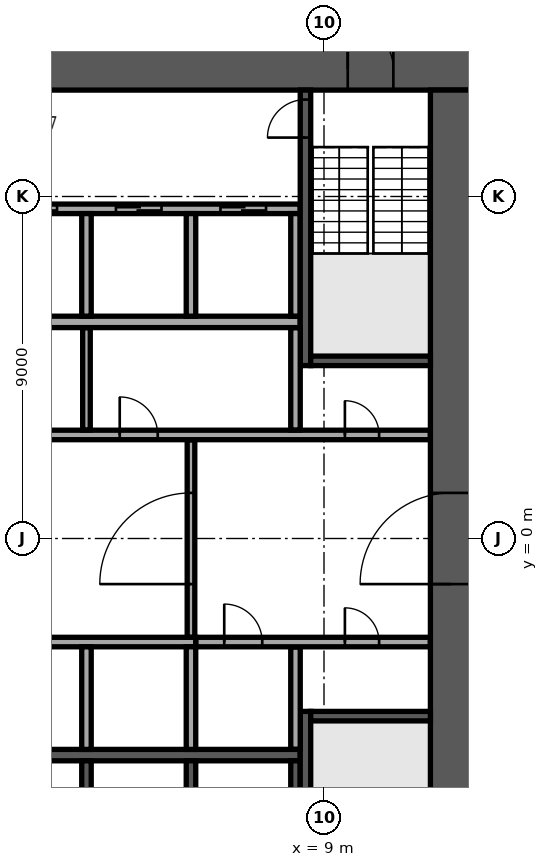
"""IFC4 building model, lengths in metres.
Left out: names, types, materials, properties, quantities, classifications, styles, units other than length and angle.
Written with IfcOpenShell. Run it as: python <this file> out.ifc"""

import sys

from ifc_helpers import new_model, si_unit, direction, frame, frame_2d, origin, place, context, subcontext, project, spatial, rectangle, extrude, element, fill, save


model = new_model("IFC4")
c1 = context("Model", 3, precision=1e-05, world=origin(), true_north=direction((0.0, 1.0)))
c2 = subcontext(c1, "Body", "Model", "MODEL_VIEW")
j1 = project(units=[si_unit("LENGTHUNIT", "METRE"), si_unit("PLANEANGLEUNIT", "RADIAN")], contexts=[c1])
p1 = place(None, origin())
s1 = spatial("IfcSite", under=j1, at=p1, CompositionType="ELEMENT")
p2 = place(p1, origin())
s2 = spatial("IfcBuilding", under=s1, at=p2, CompositionType="ELEMENT")
p3 = place(p2, frame((0.0, 0.0, 90.1)))
s3 = spatial("IfcBuildingStorey", under=s2, at=p3, CompositionType="ELEMENT", Elevation=90.1)
p4 = place(p3, frame((-12.9, 12.35, 0.0), z_axis=(0.0, 0.0, 1.0), x_axis=(1.0, 0.0, 0.0)))
e1 = element("IfcWall", 1, at=p4, inside=s3, PredefinedType="SHEAR", context=c2, shape_type="SweptSolid", body=[
    extrude(rectangle(XDim=25.8, YDim=1.1, at=frame_2d((12.9, 0.0))), origin(), (0.0, 0.0, 1.0), 3.58),
])
p5 = place(p4, frame((11.7, 0.0, 0.0)))
e2 = element("IfcOpeningElement", 2, at=p5, cuts=e1, PredefinedType="OPENING", context=c2, shape_type="SweptSolid", body=[
    extrude(rectangle(XDim=2.4, YDim=2.4, at=frame_2d((1.2, 1.2))), frame((0.0, 0.56, 0.0), z_axis=(0.0, -1.0, 0.0), x_axis=(1.0, 0.0, 0.0)), (0.0, 0.0, 1.0), 1.12),
])
p6 = place(p4, frame((22.525, 0.0, 0.0)))
e3 = element("IfcOpeningElement", 3, at=p6, cuts=e1, PredefinedType="OPENING", context=c2, shape_type="SweptSolid", body=[
    extrude(rectangle(XDim=1.2, YDim=2.1, at=frame_2d((0.6, 1.05))), frame((0.0, 0.56, 0.0), z_axis=(0.0, -1.0, 0.0), x_axis=(1.0, 0.0, 0.0)), (0.0, 0.0, 1.0), 1.12),
])
p7 = place(p4, frame((1.5, 0.0, 0.0)))
e4 = element("IfcOpeningElement", 4, at=p7, cuts=e1, PredefinedType="OPENING", context=c2, shape_type="SweptSolid", body=[
    extrude(rectangle(XDim=1.0, YDim=2.1, at=frame_2d((0.5, 1.05))), frame((0.0, 0.56, 0.0), z_axis=(0.0, -1.0, 0.0), x_axis=(1.0, 0.0, 0.0)), (0.0, 0.0, 1.0), 1.12),
])
p8 = place(p3, frame((12.35, -11.8, 0.0), z_axis=(0.0, 0.0, 1.0), x_axis=(0.0, 1.0, 0.0)))
e5 = element("IfcWall", 5, at=p8, inside=s3, PredefinedType="SHEAR", context=c2, shape_type="SweptSolid", body=[
    extrude(rectangle(XDim=23.6, YDim=1.1, at=frame_2d((11.8, 0.0))), origin(), (0.0, 0.0, 1.0), 3.58),
])
p9 = place(p8, frame((10.6, 0.0, 0.0)))
e6 = element("IfcOpeningElement", 6, at=p9, cuts=e5, PredefinedType="OPENING", context=c2, shape_type="SweptSolid", body=[
    extrude(rectangle(XDim=2.4, YDim=2.4, at=frame_2d((1.2, 1.2))), frame((0.0, 0.56, 0.0), z_axis=(0.0, -1.0, 0.0), x_axis=(1.0, 0.0, 0.0)), (0.0, 0.0, 1.0), 1.12),
])
for number, where, z_axis, x_axis in (
    (7, (-8.375, 5.7, 0.0), (0.0, 0.0, 1.0), (1.0, 0.0, 0.0)),
    (8, (-8.375, -5.7, 0.0), (0.0, 0.0, 1.0), (1.0, 0.0, 0.0)),
):
    element("IfcWall", number, at=place(p3, frame(where, z_axis=z_axis, x_axis=x_axis)), inside=s3, PredefinedType="SOLIDWALL", context=c2, shape_type="SweptSolid", body=[
        extrude(rectangle(XDim=16.75, YDim=0.3, at=frame_2d((8.375, 0.0))), origin(), (0.0, 0.0, 1.0), 3.58),
    ])
p10 = place(p3, frame((-8.375, 8.675, 0.0), z_axis=(0.0, 0.0, 1.0), x_axis=(1.0, 0.0, 0.0)))
e9 = element("IfcWall", 9, at=p10, inside=s3, PredefinedType="SOLIDWALL", context=c2, shape_type="SweptSolid", body=[
    extrude(rectangle(XDim=16.75, YDim=0.25, at=frame_2d((8.375, 0.0))), origin(), (0.0, 0.0, 1.0), 3.58),
])
p11 = place(p10, frame((0.9, 0.0, 0.0)))
e10 = element("IfcOpeningElement", 10, at=p11, cuts=e9, PredefinedType="OPENING", context=c2, shape_type="SweptSolid", body=[
    extrude(rectangle(XDim=1.2, YDim=2.1, at=frame_2d((0.6, 1.05))), frame((0.0, 0.135, 0.0), z_axis=(0.0, -1.0, 0.0), x_axis=(1.0, 0.0, 0.0)), (0.0, 0.0, 1.0), 0.27),
])
p12 = place(p10, frame((3.65, 0.0, 0.0)))
e11 = element("IfcOpeningElement", 11, at=p12, cuts=e9, PredefinedType="OPENING", context=c2, shape_type="SweptSolid", body=[
    extrude(rectangle(XDim=1.2, YDim=2.1, at=frame_2d((0.6, 1.05))), frame((0.0, 0.135, 0.0), z_axis=(0.0, -1.0, 0.0), x_axis=(1.0, 0.0, 0.0)), (0.0, 0.0, 1.0), 0.27),
])
p13 = place(p10, frame((6.4, 0.0, 0.0)))
e12 = element("IfcOpeningElement", 12, at=p13, cuts=e9, PredefinedType="OPENING", context=c2, shape_type="SweptSolid", body=[
    extrude(rectangle(XDim=1.2, YDim=2.1, at=frame_2d((0.6, 1.05))), frame((0.0, 0.135, 0.0), z_axis=(0.0, -1.0, 0.0), x_axis=(1.0, 0.0, 0.0)), (0.0, 0.0, 1.0), 0.27),
])
p14 = place(p10, frame((9.15, 0.0, 0.0)))
e13 = element("IfcOpeningElement", 13, at=p14, cuts=e9, PredefinedType="OPENING", context=c2, shape_type="SweptSolid", body=[
    extrude(rectangle(XDim=1.2, YDim=2.1, at=frame_2d((0.6, 1.05))), frame((0.0, 0.135, 0.0), z_axis=(0.0, -1.0, 0.0), x_axis=(1.0, 0.0, 0.0)), (0.0, 0.0, 1.0), 0.27),
])
p15 = place(p10, frame((11.9, 0.0, 0.0)))
e14 = element("IfcOpeningElement", 14, at=p15, cuts=e9, PredefinedType="OPENING", context=c2, shape_type="SweptSolid", body=[
    extrude(rectangle(XDim=1.2, YDim=2.1, at=frame_2d((0.6, 1.05))), frame((0.0, 0.135, 0.0), z_axis=(0.0, -1.0, 0.0), x_axis=(1.0, 0.0, 0.0)), (0.0, 0.0, 1.0), 0.27),
])
p16 = place(p10, frame((14.65, 0.0, 0.0)))
e15 = element("IfcOpeningElement", 15, at=p16, cuts=e9, PredefinedType="OPENING", context=c2, shape_type="SweptSolid", body=[
    extrude(rectangle(XDim=1.2, YDim=2.1, at=frame_2d((0.6, 1.05))), frame((0.0, 0.135, 0.0), z_axis=(0.0, -1.0, 0.0), x_axis=(1.0, 0.0, 0.0)), (0.0, 0.0, 1.0), 0.27),
])
for number, where, z_axis, x_axis in (
    (16, (2.75, 5.85, 0.0), (0.0, 0.0, 1.0), (0.0, 1.0, 0.0)),
    (17, (5.5, 5.85, 0.0), (0.0, 0.0, 1.0), (0.0, 1.0, 0.0)),
    (18, (8.25, 5.85, 0.0), (0.0, 0.0, 1.0), (0.0, 1.0, 0.0)),
):
    element("IfcWall", number, at=place(p3, frame(where, z_axis=z_axis, x_axis=x_axis)), inside=s3, PredefinedType="SOLIDWALL", context=c2, shape_type="SweptSolid", body=[
        extrude(rectangle(XDim=2.7, YDim=0.25, at=frame_2d((1.35, 0.0))), origin(), (0.0, 0.0, 1.0), 3.58),
    ])
p17 = place(p3, frame((-8.375, -2.725, 0.0), z_axis=(0.0, 0.0, 1.0), x_axis=(1.0, 0.0, 0.0)))
e19 = element("IfcWall", 19, at=p17, inside=s3, PredefinedType="SOLIDWALL", context=c2, shape_type="SweptSolid", body=[
    extrude(rectangle(XDim=14.0, YDim=0.25, at=frame_2d((7.0, 0.0))), origin(), (0.0, 0.0, 1.0), 3.58),
])
for number, where, z_axis, x_axis in (
    (20, (2.75, -5.55, 0.0), (0.0, 0.0, 1.0), (0.0, 1.0, 0.0)),
    (21, (5.5, -5.55, 0.0), (0.0, 0.0, 1.0), (0.0, 1.0, 0.0)),
    (22, (2.75, -8.55, 0.0), (0.0, 0.0, 1.0), (0.0, 1.0, 0.0)),
    (23, (5.5, -8.55, 0.0), (0.0, 0.0, 1.0), (0.0, 1.0, 0.0)),
    (24, (8.25, -8.55, 0.0), (0.0, 0.0, 1.0), (0.0, 1.0, 0.0)),
):
    element("IfcWall", number, at=place(p3, frame(where, z_axis=z_axis, x_axis=x_axis)), inside=s3, PredefinedType="SOLIDWALL", context=c2, shape_type="SweptSolid", body=[
        extrude(rectangle(XDim=2.7, YDim=0.25, at=frame_2d((1.35, 0.0))), origin(), (0.0, 0.0, 1.0), 3.58),
    ])
p18 = place(p3, frame((8.512, 4.55, 0.0), z_axis=(0.0, 0.0, 1.0), x_axis=(0.0, 1.0, 0.0)))
e25 = element("IfcWall", 25, at=p18, inside=s3, PredefinedType="SOLIDWALL", context=c2, shape_type="SweptSolid", body=[
    extrude(rectangle(XDim=7.25, YDim=0.275, at=frame_2d((3.625, 0.0))), origin(), (0.0, 0.0, 1.0), 3.58),
])
p19 = place(p18, frame((6.0, 0.0, 0.0)))
e26 = element("IfcOpeningElement", 26, at=p19, cuts=e25, PredefinedType="OPENING", context=c2, shape_type="SweptSolid", body=[
    extrude(rectangle(XDim=1.0, YDim=2.1, at=frame_2d((0.5, 1.05))), frame((0.0, 0.147, 0.0), z_axis=(0.0, -1.0, 0.0), x_axis=(1.0, 0.0, 0.0)), (0.0, 0.0, 1.0), 0.295),
])
p20 = place(p3, frame((8.65, 4.675, 0.0), z_axis=(0.0, 0.0, 1.0), x_axis=(1.0, 0.0, 0.0)))
e27 = element("IfcWall", 27, at=p20, inside=s3, PredefinedType="SOLIDWALL", context=c2, shape_type="SweptSolid", body=[
    extrude(rectangle(XDim=3.15, YDim=0.25, at=frame_2d((1.575, 0.0))), origin(), (0.0, 0.0, 1.0), 3.58),
])
p21 = place(p3, frame((8.512, -4.55, 0.0), z_axis=(0.0, 0.0, 1.0), x_axis=(0.0, -1.0, 0.0)))
e28 = element("IfcWall", 28, at=p21, inside=s3, PredefinedType="SOLIDWALL", context=c2, shape_type="SweptSolid", body=[
    extrude(rectangle(XDim=7.25, YDim=0.275, at=frame_2d((3.625, 0.0))), origin(), (0.0, 0.0, 1.0), 3.58),
])
p22 = place(p21, frame((6.0, 0.0, 0.0)))
e29 = element("IfcOpeningElement", 29, at=p22, cuts=e28, PredefinedType="OPENING", context=c2, shape_type="SweptSolid", body=[
    extrude(rectangle(XDim=1.0, YDim=2.1, at=frame_2d((0.5, 1.05))), frame((0.0, 0.147, 0.0), z_axis=(0.0, -1.0, 0.0), x_axis=(1.0, 0.0, 0.0)), (0.0, 0.0, 1.0), 0.295),
])
p23 = place(p3, frame((8.65, -4.675, 0.0), z_axis=(0.0, 0.0, 1.0), x_axis=(1.0, 0.0, 0.0)))
e30 = element("IfcWall", 30, at=p23, inside=s3, PredefinedType="SOLIDWALL", context=c2, shape_type="SweptSolid", body=[
    extrude(rectangle(XDim=3.15, YDim=0.25, at=frame_2d((1.575, 0.0))), origin(), (0.0, 0.0, 1.0), 3.58),
])
p24 = place(p3, frame((8.25, -5.545, 0.0), z_axis=(0.0, 0.0, 1.0), x_axis=(0.0, 1.0, 0.0)))
e31 = element("IfcWall", 31, at=p24, inside=s3, PredefinedType="PARTITIONING", context=c2, shape_type="SweptSolid", body=[
    extrude(rectangle(XDim=2.69, YDim=0.25, at=frame_2d((1.345, 0.0))), origin(), (0.0, 0.0, 1.0), 3.58),
])
p25 = place(p3, frame((5.63, -2.725, 0.0), z_axis=(0.0, 0.0, 1.0), x_axis=(1.0, 0.0, 0.0)))
e32 = element("IfcWall", 32, at=p25, inside=s3, PredefinedType="PARTITIONING", context=c2, shape_type="SweptSolid", body=[
    extrude(rectangle(XDim=6.165, YDim=0.25, at=frame_2d((3.083, 0.0))), origin(), (0.0, 0.0, 1.0), 3.58),
])
p26 = place(p25, frame((0.745, 0.0, 0.0)))
e33 = element("IfcOpeningElement", 33, at=p26, cuts=e32, PredefinedType="OPENING", context=c2, shape_type="SweptSolid", body=[
    extrude(rectangle(XDim=1.0, YDim=2.1, at=frame_2d((0.5, 1.05))), frame((0.0, 0.135, 0.0), z_axis=(0.0, -1.0, 0.0), x_axis=(1.0, 0.0, 0.0)), (0.0, 0.0, 1.0), 0.27),
])
p27 = place(p25, frame((3.92, 0.0, 0.0)))
e34 = element("IfcOpeningElement", 34, at=p27, cuts=e32, PredefinedType="OPENING", context=c2, shape_type="SweptSolid", body=[
    extrude(rectangle(XDim=0.9, YDim=2.1, at=frame_2d((0.45, 1.05))), frame((0.0, 0.135, 0.0), z_axis=(0.0, -1.0, 0.0), x_axis=(1.0, 0.0, 0.0)), (0.0, 0.0, 1.0), 0.27),
])
p28 = place(p3, frame((5.5, -2.595, 0.0), z_axis=(0.0, 0.0, 1.0), x_axis=(0.0, 1.0, 0.0)))
e35 = element("IfcWall", 35, at=p28, inside=s3, PredefinedType="PARTITIONING", context=c2, shape_type="SweptSolid", body=[
    extrude(rectangle(XDim=5.19, YDim=0.2, at=frame_2d((2.595, 0.0))), origin(), (0.0, 0.0, 1.0), 3.58),
])
p29 = place(p28, frame((1.395, 0.0, 0.0)))
e36 = element("IfcOpeningElement", 36, at=p29, cuts=e35, PredefinedType="OPENING", context=c2, shape_type="SweptSolid", body=[
    extrude(rectangle(XDim=2.4, YDim=2.4, at=frame_2d((1.2, 1.2))), frame((0.0, 0.11, 0.0), z_axis=(0.0, -1.0, 0.0), x_axis=(1.0, 0.0, 0.0)), (0.0, 0.0, 1.0), 0.22),
])
p30 = place(p3, frame((-11.795, 2.725, 0.0), z_axis=(0.0, 0.0, 1.0), x_axis=(1.0, 0.0, 0.0)))
e37 = element("IfcWall", 37, at=p30, inside=s3, PredefinedType="PARTITIONING", context=c2, shape_type="SweptSolid", body=[
    extrude(rectangle(XDim=23.59, YDim=0.25, at=frame_2d((11.795, 0.0))), origin(), (0.0, 0.0, 1.0), 3.58),
])
p31 = place(p30, frame((21.345, 0.0, 0.0)))
e38 = element("IfcOpeningElement", 38, at=p31, cuts=e37, PredefinedType="OPENING", context=c2, shape_type="SweptSolid", body=[
    extrude(rectangle(XDim=0.9, YDim=2.1, at=frame_2d((0.45, 1.05))), frame((0.0, 0.135, 0.0), z_axis=(0.0, -1.0, 0.0), x_axis=(1.0, 0.0, 0.0)), (0.0, 0.0, 1.0), 0.27),
])
p32 = place(p30, frame((1.345, 0.0, 0.0)))
e39 = element("IfcOpeningElement", 39, at=p32, cuts=e37, PredefinedType="OPENING", context=c2, shape_type="SweptSolid", body=[
    extrude(rectangle(XDim=0.9, YDim=2.1, at=frame_2d((0.45, 1.05))), frame((0.0, 0.135, 0.0), z_axis=(0.0, -1.0, 0.0), x_axis=(1.0, 0.0, 0.0)), (0.0, 0.0, 1.0), 0.27),
])
p33 = place(p30, frame((4.32, 0.0, 0.0)))
e40 = element("IfcOpeningElement", 40, at=p33, cuts=e37, PredefinedType="OPENING", context=c2, shape_type="SweptSolid", body=[
    extrude(rectangle(XDim=1.2, YDim=2.1, at=frame_2d((0.6, 1.05))), frame((0.0, 0.135, 0.0), z_axis=(0.0, -1.0, 0.0), x_axis=(1.0, 0.0, 0.0)), (0.0, 0.0, 1.0), 0.27),
])
p34 = place(p30, frame((15.42, 0.0, 0.0)))
e41 = element("IfcOpeningElement", 41, at=p34, cuts=e37, PredefinedType="OPENING", context=c2, shape_type="SweptSolid", body=[
    extrude(rectangle(XDim=1.0, YDim=2.1, at=frame_2d((0.5, 1.05))), frame((0.0, 0.135, 0.0), z_axis=(0.0, -1.0, 0.0), x_axis=(1.0, 0.0, 0.0)), (0.0, 0.0, 1.0), 0.27),
])
p35 = place(p3, frame((2.75, 2.855, 0.0), z_axis=(0.0, 0.0, 1.0), x_axis=(0.0, 1.0, 0.0)))
e42 = element("IfcWall", 42, at=p35, inside=s3, PredefinedType="PARTITIONING", context=c2, shape_type="SweptSolid", body=[
    extrude(rectangle(XDim=2.69, YDim=0.2, at=frame_2d((1.345, 0.0))), origin(), (0.0, 0.0, 1.0), 3.58),
])
p36 = place(p3, frame((8.25, 2.855, 0.0), z_axis=(0.0, 0.0, 1.0), x_axis=(0.0, 1.0, 0.0)))
e43 = element("IfcWall", 43, at=p36, inside=s3, PredefinedType="PARTITIONING", context=c2, shape_type="SweptSolid", body=[
    extrude(rectangle(XDim=2.69, YDim=0.25, at=frame_2d((1.345, 0.0))), origin(), (0.0, 0.0, 1.0), 3.58),
])
p37 = place(p6, origin())
e44 = element("IfcDoor", 44, at=p37, inside=s3, OperationType="SINGLE_SWING_LEFT", PredefinedType="DOOR", context=c2, shape_type="SweptSolid", body=[
    extrude(rectangle(XDim=1.2, YDim=2.1, at=frame_2d((0.6, 1.05))), frame((0.0, 0.025, 0.0), z_axis=(0.0, -1.0, 0.0), x_axis=(1.0, 0.0, 0.0)), (0.0, 0.0, 1.0), 0.05),
])
fill(e3, e44)
p38 = place(p9, origin())
e45 = element("IfcDoor", 45, at=p38, inside=s3, OperationType="SINGLE_SWING_LEFT", PredefinedType="DOOR", context=c2, shape_type="SweptSolid", body=[
    extrude(rectangle(XDim=2.4, YDim=2.4, at=frame_2d((1.2, 1.2))), frame((0.0, 0.025, 0.0), z_axis=(0.0, -1.0, 0.0), x_axis=(1.0, 0.0, 0.0)), (0.0, 0.0, 1.0), 0.05),
])
fill(e6, e45)
p39 = place(p14, origin())
e46 = element("IfcDoor", 46, at=p39, inside=s3, OperationType="DOUBLE_DOOR_SLIDING", PredefinedType="DOOR", context=c2, shape_type="SweptSolid", body=[
    extrude(rectangle(XDim=1.2, YDim=2.1, at=frame_2d((0.6, 1.05))), frame((0.0, 0.025, 0.0), z_axis=(0.0, -1.0, 0.0), x_axis=(1.0, 0.0, 0.0)), (0.0, 0.0, 1.0), 0.05),
])
fill(e13, e46)
p40 = place(p15, origin())
e47 = element("IfcDoor", 47, at=p40, inside=s3, OperationType="DOUBLE_DOOR_SLIDING", PredefinedType="DOOR", context=c2, shape_type="SweptSolid", body=[
    extrude(rectangle(XDim=1.2, YDim=2.1, at=frame_2d((0.6, 1.05))), frame((0.0, 0.025, 0.0), z_axis=(0.0, -1.0, 0.0), x_axis=(1.0, 0.0, 0.0)), (0.0, 0.0, 1.0), 0.05),
])
fill(e14, e47)
p41 = place(p16, origin())
e48 = element("IfcDoor", 48, at=p41, inside=s3, OperationType="DOUBLE_DOOR_SLIDING", PredefinedType="DOOR", context=c2, shape_type="SweptSolid", body=[
    extrude(rectangle(XDim=1.2, YDim=2.1, at=frame_2d((0.6, 1.05))), frame((0.0, 0.025, 0.0), z_axis=(0.0, -1.0, 0.0), x_axis=(1.0, 0.0, 0.0)), (0.0, 0.0, 1.0), 0.05),
])
fill(e15, e48)
p42 = place(p19, origin())
e49 = element("IfcDoor", 49, at=p42, inside=s3, OperationType="SINGLE_SWING_LEFT", PredefinedType="DOOR", context=c2, shape_type="SweptSolid", body=[
    extrude(rectangle(XDim=1.0, YDim=2.1, at=frame_2d((0.5, 1.05))), frame((0.0, 0.025, 0.0), z_axis=(0.0, -1.0, 0.0), x_axis=(1.0, 0.0, 0.0)), (0.0, 0.0, 1.0), 0.05),
])
fill(e26, e49)
p43 = place(p26, origin())
e50 = element("IfcDoor", 50, at=p43, inside=s3, OperationType="SINGLE_SWING_LEFT", PredefinedType="DOOR", context=c2, shape_type="SweptSolid", body=[
    extrude(rectangle(XDim=1.0, YDim=2.1, at=frame_2d((0.5, 1.05))), frame((0.0, 0.025, 0.0), z_axis=(0.0, -1.0, 0.0), x_axis=(1.0, 0.0, 0.0)), (0.0, 0.0, 1.0), 0.05),
])
fill(e33, e50)
p44 = place(p31, origin())
e51 = element("IfcDoor", 51, at=p44, inside=s3, OperationType="SINGLE_SWING_LEFT", PredefinedType="DOOR", context=c2, shape_type="SweptSolid", body=[
    extrude(rectangle(XDim=0.9, YDim=2.1, at=frame_2d((0.45, 1.05))), frame((0.0, 0.025, 0.0), z_axis=(0.0, -1.0, 0.0), x_axis=(1.0, 0.0, 0.0)), (0.0, 0.0, 1.0), 0.05),
])
fill(e38, e51)
p45 = place(p27, origin())
e52 = element("IfcDoor", 52, at=p45, inside=s3, OperationType="SINGLE_SWING_LEFT", PredefinedType="DOOR", context=c2, shape_type="SweptSolid", body=[
    extrude(rectangle(XDim=0.9, YDim=2.1, at=frame_2d((0.45, 1.05))), frame((0.0, 0.025, 0.0), z_axis=(0.0, -1.0, 0.0), x_axis=(1.0, 0.0, 0.0)), (0.0, 0.0, 1.0), 0.05),
])
fill(e34, e52)
p46 = place(p34, origin())
e53 = element("IfcDoor", 53, at=p46, inside=s3, OperationType="SINGLE_SWING_LEFT", PredefinedType="DOOR", context=c2, shape_type="SweptSolid", body=[
    extrude(rectangle(XDim=1.0, YDim=2.1, at=frame_2d((0.5, 1.05))), frame((0.0, 0.025, 0.0), z_axis=(0.0, -1.0, 0.0), x_axis=(1.0, 0.0, 0.0)), (0.0, 0.0, 1.0), 0.05),
])
fill(e41, e53)
p47 = place(p29, origin())
e54 = element("IfcDoor", 54, at=p47, inside=s3, OperationType="SINGLE_SWING_LEFT", PredefinedType="DOOR", context=c2, shape_type="SweptSolid", body=[
    extrude(rectangle(XDim=2.4, YDim=2.4, at=frame_2d((1.2, 1.2))), frame((0.0, 0.025, 0.0), z_axis=(0.0, -1.0, 0.0), x_axis=(1.0, 0.0, 0.0)), (0.0, 0.0, 1.0), 0.05),
])
fill(e36, e54)
save(model, sys.argv[1])
